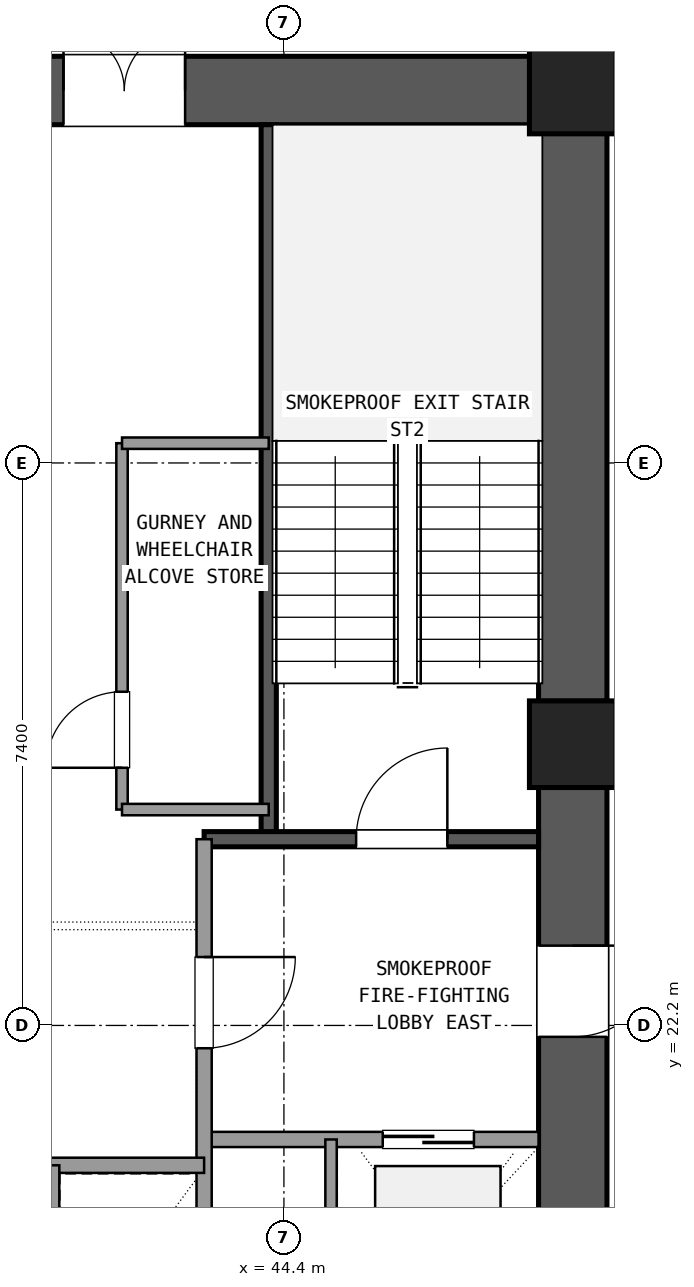
"""IFC4 building model, lengths in metres.
Left out: names, types, materials, properties, quantities, classifications, styles, units other than length and angle.
Written with IfcOpenShell. Run it as: python <this file> out.ifc"""

import sys

from ifc_helpers import new_model, si_unit, direction, frame, frame_2d, origin, origin_2d, place, context, subcontext, project, spatial, rectangle, extrude, element, fill, save


model = new_model("IFC4")
c1 = context("Model", 3, precision=1e-05, world=origin(), true_north=direction((0.0, 1.0)))
c2 = subcontext(c1, "Body", "Model", "MODEL_VIEW")
j1 = project(units=[si_unit("LENGTHUNIT", "METRE"), si_unit("PLANEANGLEUNIT", "RADIAN")], contexts=[c1])
p1 = place(None, origin())
s1 = spatial("IfcSite", under=j1, at=p1, CompositionType="ELEMENT")
p2 = place(p1, origin())
s2 = spatial("IfcBuilding", under=s1, at=p2, CompositionType="ELEMENT")
p3 = place(p2, frame((0.0, 0.0, 14.4)))
s3 = spatial("IfcBuildingStorey", under=s2, at=p3, CompositionType="ELEMENT", Elevation=14.4)
for number, where, z_axis, x_axis in (
    (1, (48.2, 25.9, 0.0), (0.0, 0.0, 1.0), (1.0, 0.0, 0.0)),
    (2, (48.2, 34.5, 0.0), (0.0, 0.0, 1.0), (1.0, 0.0, 0.0)),
):
    element("IfcColumn", number, at=place(p3, frame(where, z_axis=z_axis, x_axis=x_axis)), inside=s3, PredefinedType="COLUMN", context=c2, shape_type="SweptSolid", body=[
        extrude(rectangle(XDim=1.14, YDim=1.14, at=origin_2d()), origin(), (0.0, 0.0, 1.0), 4.5),
    ])
p4 = place(p3, frame((48.2, 17.865, 0.0), z_axis=(0.0, 0.0, 1.0), x_axis=(0.0, 1.0, 0.0)))
e3 = element("IfcWall", 3, at=p4, inside=s3, PredefinedType="SHEAR", context=c2, shape_type="SweptSolid", body=[
    extrude(rectangle(XDim=7.47, YDim=0.9, at=frame_2d((3.735, 0.0))), origin(), (0.0, 0.0, 1.0), 4.2),
])
p5 = place(p4, frame((4.185, 0.0, 0.0)))
e4 = element("IfcOpeningElement", 4, at=p5, cuts=e3, PredefinedType="OPENING", context=c2, shape_type="SweptSolid", body=[
    extrude(rectangle(XDim=1.2, YDim=2.15, at=frame_2d((0.6, 1.075))), frame((0.0, 0.46, 0.0), z_axis=(0.0, -1.0, 0.0), x_axis=(1.0, 0.0, 0.0)), (0.0, 0.0, 1.0), 0.92),
])
p6 = place(p3, frame((48.2, 26.465, 0.0), z_axis=(0.0, 0.0, 1.0), x_axis=(0.0, 1.0, 0.0)))
e5 = element("IfcWall", 5, at=p6, inside=s3, PredefinedType="SHEAR", context=c2, shape_type="SweptSolid", body=[
    extrude(rectangle(XDim=7.47, YDim=0.9, at=frame_2d((3.735, 0.0))), origin(), (0.0, 0.0, 1.0), 4.2),
])
p7 = place(p3, frame((47.635, 34.5, 0.0), z_axis=(0.0, 0.0, 1.0), x_axis=(-1.0, 0.0, 0.0)))
e6 = element("IfcWall", 6, at=p7, inside=s3, PredefinedType="SHEAR", context=c2, shape_type="SweptSolid", body=[
    extrude(rectangle(XDim=10.07, YDim=0.9, at=frame_2d((5.035, 0.0))), origin(), (0.0, 0.0, 1.0), 4.2),
])
p8 = place(p7, frame((4.535, 0.0, 0.0)))
e7 = element("IfcOpeningElement", 7, at=p8, cuts=e6, PredefinedType="OPENING", context=c2, shape_type="SweptSolid", body=[
    extrude(rectangle(XDim=1.6, YDim=2.2, at=frame_2d((0.8, 1.1))), frame((0.0, 0.46, 0.0), z_axis=(0.0, -1.0, 0.0), x_axis=(1.0, 0.0, 0.0)), (0.0, 0.0, 1.0), 0.92),
])
p9 = place(p3, frame((44.2, 24.65, 0.0), z_axis=(0.0, 0.0, 1.0), x_axis=(0.0, 1.0, 0.0)))
e8 = element("IfcWall", 8, at=p9, inside=s3, PredefinedType="SHEAR", context=c2, shape_type="SweptSolid", body=[
    extrude(rectangle(XDim=9.4, YDim=0.2, at=frame_2d((4.7, 0.0))), origin(), (0.0, 0.0, 1.0), 4.2),
])
p10 = place(p3, frame((43.35, 24.65, 0.0), z_axis=(0.0, 0.0, 1.0), x_axis=(1.0, 0.0, 0.0)))
e9 = element("IfcWall", 9, at=p10, inside=s3, PredefinedType="SHEAR", context=c2, shape_type="SweptSolid", body=[
    extrude(rectangle(XDim=4.4, YDim=0.2, at=frame_2d((2.2, 0.0))), origin(), (0.0, 0.0, 1.0), 4.2),
])
p11 = place(p10, frame((2.0, 0.0, 0.0)))
e10 = element("IfcOpeningElement", 10, at=p11, cuts=e9, PredefinedType="OPENING", context=c2, shape_type="SweptSolid", body=[
    extrude(rectangle(XDim=1.2, YDim=2.15, at=frame_2d((0.6, 1.075))), frame((0.0, 0.11, 0.0), z_axis=(0.0, -1.0, 0.0), x_axis=(1.0, 0.0, 0.0)), (0.0, 0.0, 1.0), 0.22),
])
p12 = place(p3, frame((43.35, 20.7, 0.0), z_axis=(0.0, 0.0, 1.0), x_axis=(1.0, 0.0, 0.0)))
e11 = element("IfcWall", 11, at=p12, inside=s3, PredefinedType="SOLIDWALL", context=c2, shape_type="SweptSolid", body=[
    extrude(rectangle(XDim=4.4, YDim=0.2, at=frame_2d((2.2, 0.0))), origin(), (0.0, 0.0, 1.0), 3.21),
])
p13 = place(p12, frame((2.35, 0.0, 0.0)))
e12 = element("IfcOpeningElement", 12, at=p13, cuts=e11, PredefinedType="OPENING", context=c2, shape_type="SweptSolid", body=[
    extrude(rectangle(XDim=1.2, YDim=2.15, at=frame_2d((0.6, 1.075))), frame((0.0, 0.11, 0.0), z_axis=(0.0, -1.0, 0.0), x_axis=(1.0, 0.0, 0.0)), (0.0, 0.0, 1.0), 0.22),
])
p14 = place(p3, frame((43.35, 17.75, 0.0), z_axis=(0.0, 0.0, 1.0), x_axis=(0.0, 1.0, 0.0)))
e13 = element("IfcWall", 13, at=p14, inside=s3, PredefinedType="SOLIDWALL", context=c2, shape_type="SweptSolid", body=[
    extrude(rectangle(XDim=6.9, YDim=0.2, at=frame_2d((3.45, 0.0))), origin(), (0.0, 0.0, 1.0), 3.21),
])
p15 = place(p14, frame((4.15, 0.0, 0.0)))
e14 = element("IfcOpeningElement", 14, at=p15, cuts=e13, PredefinedType="OPENING", context=c2, shape_type="SweptSolid", body=[
    extrude(rectangle(XDim=1.2, YDim=2.15, at=frame_2d((0.6, 1.075))), frame((0.0, 0.11, 0.0), z_axis=(0.0, -1.0, 0.0), x_axis=(1.0, 0.0, 0.0)), (0.0, 0.0, 1.0), 0.22),
])
p16 = place(p3, frame((45.02, 17.75, 0.0), z_axis=(0.0, 0.0, 1.0), x_axis=(0.0, 1.0, 0.0)))
e15 = element("IfcWall", 15, at=p16, inside=s3, PredefinedType="PARTITIONING", context=c2, shape_type="SweptSolid", body=[
    extrude(rectangle(XDim=2.95, YDim=0.15, at=frame_2d((1.475, 0.0))), origin(), (0.0, 0.0, 1.0), 3.21),
])
p17 = place(p3, frame((37.25, 20.36, 0.0), z_axis=(0.0, 0.0, 1.0), x_axis=(1.0, 0.0, 0.0)))
e16 = element("IfcWall", 16, at=p17, inside=s3, PredefinedType="SOLIDWALL", context=c2, shape_type="SweptSolid", body=[
    extrude(rectangle(XDim=6.1, YDim=0.2, at=frame_2d((3.05, 0.0))), origin(), (0.0, 0.0, 1.0), 3.21),
])
p18 = place(p3, frame((41.37, 17.75, 0.0), z_axis=(0.0, 0.0, 1.0), x_axis=(0.0, 1.0, 0.0)))
e17 = element("IfcWall", 17, at=p18, inside=s3, PredefinedType="PARTITIONING", context=c2, shape_type="SweptSolid", body=[
    extrude(rectangle(XDim=2.61, YDim=0.15, at=frame_2d((1.305, 0.0))), origin(), (0.0, 0.0, 1.0), 3.21),
])
p19 = place(p3, frame((42.27, 25.04, 0.0), z_axis=(0.0, 0.0, 1.0), x_axis=(0.0, 1.0, 0.0)))
e18 = element("IfcWall", 18, at=p19, inside=s3, PredefinedType="PARTITIONING", context=c2, shape_type="SweptSolid", body=[
    extrude(rectangle(XDim=4.82, YDim=0.15, at=frame_2d((2.41, 0.0))), origin(), (0.0, 0.0, 1.0), 3.21),
])
p20 = place(p19, frame((0.55, 0.0, 0.0)))
e19 = element("IfcOpeningElement", 19, at=p20, cuts=e18, PredefinedType="OPENING", context=c2, shape_type="SweptSolid", body=[
    extrude(rectangle(XDim=1.0, YDim=2.15, at=frame_2d((0.5, 1.075))), frame((0.0, 0.085, 0.0), z_axis=(0.0, -1.0, 0.0), x_axis=(1.0, 0.0, 0.0)), (0.0, 0.0, 1.0), 0.17),
])
for number, where, z_axis, x_axis in (
    (20, (42.27, 25.04, 0.0), (0.0, 0.0, 1.0), (1.0, 0.0, 0.0)),
    (21, (42.27, 29.86, 0.0), (0.0, 0.0, 1.0), (1.0, 0.0, 0.0)),
):
    element("IfcWall", number, at=place(p3, frame(where, z_axis=z_axis, x_axis=x_axis)), inside=s3, PredefinedType="PARTITIONING", context=c2, shape_type="SweptSolid", body=[
        extrude(rectangle(XDim=1.93, YDim=0.15, at=frame_2d((0.965, 0.0))), origin(), (0.0, 0.0, 1.0), 3.21),
    ])
p21 = place(p11, origin())
e22 = element("IfcDoor", 22, at=p21, inside=s3, OperationType="SINGLE_SWING_RIGHT", PredefinedType="DOOR", context=c2, shape_type="SweptSolid", body=[
    extrude(rectangle(XDim=1.2, YDim=2.15, at=frame_2d((0.6, 1.075))), frame((0.0, 0.025, 0.0), z_axis=(0.0, -1.0, 0.0), x_axis=(1.0, 0.0, 0.0)), (0.0, 0.0, 1.0), 0.05),
])
fill(e10, e22)
p22 = place(p13, origin())
e23 = element("IfcDoor", 23, at=p22, inside=s3, OperationType="SLIDING_TO_RIGHT", PredefinedType="DOOR", context=c2, shape_type="SweptSolid", body=[
    extrude(rectangle(XDim=1.2, YDim=2.15, at=frame_2d((0.6, 1.075))), frame((0.0, 0.025, 0.0), z_axis=(0.0, -1.0, 0.0), x_axis=(1.0, 0.0, 0.0)), (0.0, 0.0, 1.0), 0.05),
])
fill(e12, e23)
p23 = place(p15, frame((1.2, 0.0, 0.0), z_axis=(0.0, 0.0, 1.0), x_axis=(-1.0, 0.0, 0.0)))
e24 = element("IfcDoor", 24, at=p23, inside=s3, OperationType="SINGLE_SWING_RIGHT", PredefinedType="DOOR", context=c2, shape_type="SweptSolid", body=[
    extrude(rectangle(XDim=1.2, YDim=2.15, at=frame_2d((0.6, 1.075))), frame((0.0, 0.025, 0.0), z_axis=(0.0, -1.0, 0.0), x_axis=(1.0, 0.0, 0.0)), (0.0, 0.0, 1.0), 0.05),
])
fill(e14, e24)
p24 = place(p5, frame((1.2, 0.0, 0.0), z_axis=(0.0, 0.0, 1.0), x_axis=(-1.0, 0.0, 0.0)))
e25 = element("IfcDoor", 25, at=p24, inside=s3, OperationType="SINGLE_SWING_RIGHT", PredefinedType="DOOR", context=c2, shape_type="SweptSolid", body=[
    extrude(rectangle(XDim=1.2, YDim=2.15, at=frame_2d((0.6, 1.075))), frame((0.0, 0.025, 0.0), z_axis=(0.0, -1.0, 0.0), x_axis=(1.0, 0.0, 0.0)), (0.0, 0.0, 1.0), 0.05),
])
fill(e4, e25)
p25 = place(p8, frame((1.6, 0.0, 0.0), z_axis=(0.0, 0.0, 1.0), x_axis=(-1.0, 0.0, 0.0)))
e26 = element("IfcDoor", 26, at=p25, inside=s3, OperationType="DOUBLE_DOOR_SINGLE_SWING", PredefinedType="DOOR", context=c2, shape_type="SweptSolid", body=[
    extrude(rectangle(XDim=1.6, YDim=2.2, at=frame_2d((0.8, 1.1))), frame((0.0, 0.025, 0.0), z_axis=(0.0, -1.0, 0.0), x_axis=(1.0, 0.0, 0.0)), (0.0, 0.0, 1.0), 0.05),
])
fill(e7, e26)
p26 = place(p20, origin())
e27 = element("IfcDoor", 27, at=p26, inside=s3, OperationType="SINGLE_SWING_LEFT", PredefinedType="DOOR", context=c2, shape_type="SweptSolid", body=[
    extrude(rectangle(XDim=1.0, YDim=2.15, at=frame_2d((0.5, 1.075))), frame((0.0, 0.025, 0.0), z_axis=(0.0, -1.0, 0.0), x_axis=(1.0, 0.0, 0.0)), (0.0, 0.0, 1.0), 0.05),
])
fill(e19, e27)
save(model, sys.argv[1])
